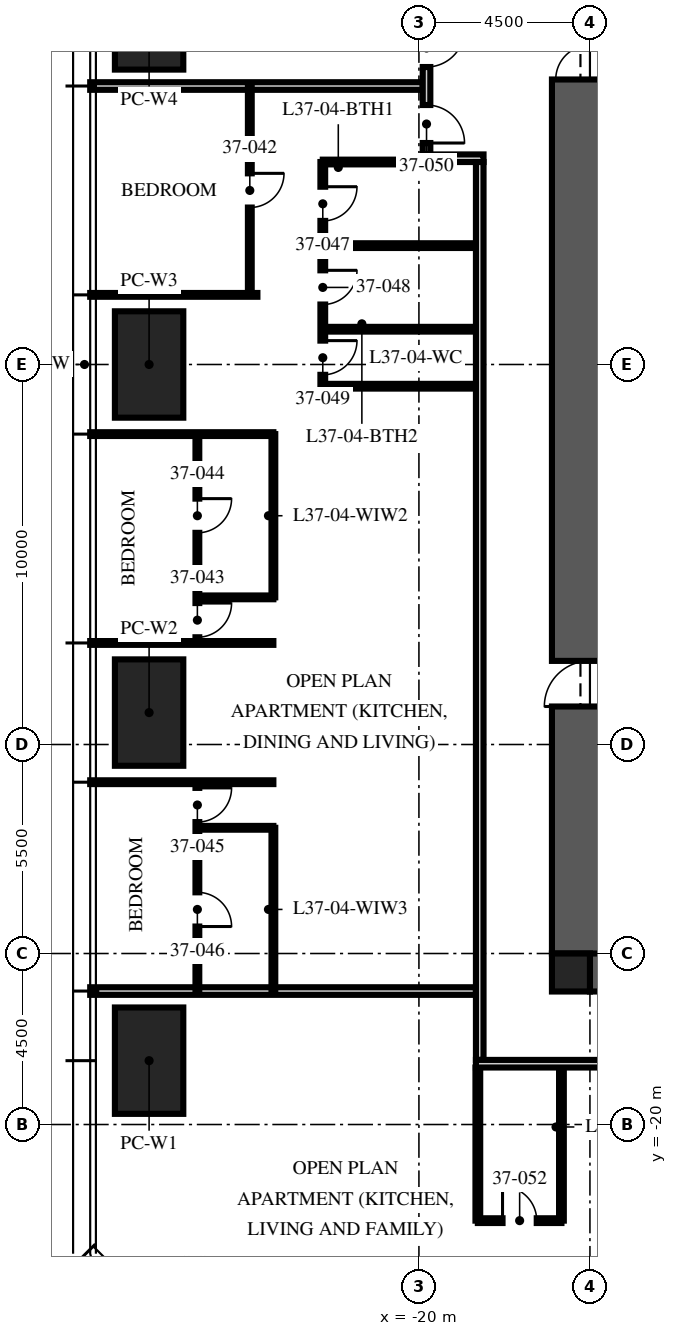
"""IFC4 building model, lengths in metres.
Left out: names, types, materials, properties, quantities, classifications, styles, units other than length and angle.
Written with IfcOpenShell. Run it as: python <this file> out.ifc"""

import sys

from ifc_helpers import new_model, si_unit, direction, frame, frame_2d, origin, origin_2d, place, context, subcontext, project, spatial, rectangle, extrude, element, fill, save


model = new_model("IFC4")
c1 = context("Model", 3, precision=1e-05, world=origin(), true_north=direction((0.0, 1.0)))
c2 = subcontext(c1, "Body", "Model", "MODEL_VIEW")
j1 = project(units=[si_unit("LENGTHUNIT", "METRE"), si_unit("PLANEANGLEUNIT", "RADIAN")], contexts=[c1])
p1 = place(None, origin())
s1 = spatial("IfcSite", under=j1, at=p1, CompositionType="ELEMENT")
p2 = place(p1, origin())
s2 = spatial("IfcBuilding", under=s1, at=p2, CompositionType="ELEMENT")
p3 = place(p2, frame((0.0, 0.0, 148.5)))
s3 = spatial("IfcBuildingStorey", under=s2, at=p3, CompositionType="ELEMENT", Elevation=148.5)
p4 = place(p3, frame((-15.5, -15.5, -0.25), z_axis=(0.0, 0.0, 1.0), x_axis=(1.0, 0.0, 0.0)))
e1 = element("IfcWall", 1, at=p4, inside=s3, PredefinedType="SHEAR", context=c2, shape_type="SweptSolid", body=[
    extrude(rectangle(XDim=31.0, YDim=2.0, at=frame_2d((15.5, 0.0))), origin(), (0.0, 0.0, 1.0), 3.75),
])
p5 = place(p4, frame((10.4, 0.0, 0.25)))
e2 = element("IfcOpeningElement", 2, at=p5, cuts=e1, PredefinedType="OPENING", context=c2, shape_type="SweptSolid", body=[
    extrude(rectangle(XDim=1.1, YDim=2.1, at=frame_2d((0.55, 1.05))), frame((0.0, 1.01, 0.0), z_axis=(0.0, -1.0, 0.0), x_axis=(1.0, 0.0, 0.0)), (0.0, 0.0, 1.0), 2.02),
])
p6 = place(p4, frame((13.5, 0.0, 0.25)))
e3 = element("IfcOpeningElement", 3, at=p6, cuts=e1, PredefinedType="OPENING", context=c2, shape_type="SweptSolid", body=[
    extrude(rectangle(XDim=1.1, YDim=2.1, at=frame_2d((0.55, 1.05))), frame((0.0, 1.01, 0.0), z_axis=(0.0, -1.0, 0.0), x_axis=(1.0, 0.0, 0.0)), (0.0, 0.0, 1.0), 2.02),
])
p7 = place(p4, frame((16.6, 0.0, 0.25)))
e4 = element("IfcOpeningElement", 4, at=p7, cuts=e1, PredefinedType="OPENING", context=c2, shape_type="SweptSolid", body=[
    extrude(rectangle(XDim=1.1, YDim=2.1, at=frame_2d((0.55, 1.05))), frame((0.0, 1.01, 0.0), z_axis=(0.0, -1.0, 0.0), x_axis=(1.0, 0.0, 0.0)), (0.0, 0.0, 1.0), 2.02),
])
p8 = place(p3, frame((-15.5, -12.0, -0.25), z_axis=(0.0, 0.0, 1.0), x_axis=(1.0, 0.0, 0.0)))
e5 = element("IfcWall", 5, at=p8, inside=s3, PredefinedType="SHEAR", context=c2, shape_type="SweptSolid", body=[
    extrude(rectangle(XDim=31.0, YDim=0.8, at=frame_2d((15.5, 0.0))), origin(), (0.0, 0.0, 1.0), 3.75),
])
p9 = place(p3, frame((-15.5, -15.5, -0.25), z_axis=(0.0, 0.0, 1.0), x_axis=(0.0, 1.0, 0.0)))
e6 = element("IfcWall", 6, at=p9, inside=s3, PredefinedType="SHEAR", context=c2, shape_type="SweptSolid", body=[
    extrude(rectangle(XDim=31.0, YDim=2.0, at=frame_2d((15.5, 0.0))), origin(), (0.0, 0.0, 1.0), 3.75),
])
p10 = place(p9, frame((6.5, 0.0, 0.25)))
e7 = element("IfcOpeningElement", 7, at=p10, cuts=e6, PredefinedType="OPENING", context=c2, shape_type="SweptSolid", body=[
    extrude(rectangle(XDim=1.2, YDim=2.1, at=frame_2d((0.6, 1.05))), frame((0.0, 1.01, 0.0), z_axis=(0.0, -1.0, 0.0), x_axis=(1.0, 0.0, 0.0)), (0.0, 0.0, 1.0), 2.02),
])
p11 = place(p9, frame((23.0, 0.0, 0.25)))
e8 = element("IfcOpeningElement", 8, at=p11, cuts=e6, PredefinedType="OPENING", context=c2, shape_type="SweptSolid", body=[
    extrude(rectangle(XDim=1.8, YDim=2.1, at=frame_2d((0.9, 1.05))), frame((0.0, 1.01, 0.0), z_axis=(0.0, -1.0, 0.0), x_axis=(1.0, 0.0, 0.0)), (0.0, 0.0, 1.0), 2.02),
])
p12 = place(p3, frame((-16.0, -16.0, -0.25), z_axis=(0.0, 0.0, 1.0), x_axis=(1.0, 0.0, 0.0)))
e9 = element("IfcColumn", 9, at=p12, inside=s3, PredefinedType="COLUMN", context=c2, shape_type="SweptSolid", body=[
    extrude(rectangle(XDim=1.0, YDim=1.0, at=origin_2d()), origin(), (0.0, 0.0, 1.0), 3.75),
])
for number, where, z_axis, x_axis in (
    (10, (-27.1, -18.32, 0.0), (0.0, 0.0, 1.0), (0.0, 1.0, 0.0)),
    (11, (-27.1, -9.16, 0.0), (0.0, 0.0, 1.0), (0.0, 1.0, 0.0)),
    (12, (-27.1, 0.0, 0.0), (0.0, 0.0, 1.0), (0.0, 1.0, 0.0)),
    (13, (-27.1, 9.16, 0.0), (0.0, 0.0, 1.0), (0.0, 1.0, 0.0)),
):
    element("IfcColumn", number, at=place(p3, frame(where, z_axis=z_axis, x_axis=x_axis)), inside=s3, PredefinedType="COLUMN", context=c2, shape_type="SweptSolid", body=[
        extrude(rectangle(XDim=2.8, YDim=1.8, at=origin_2d()), origin(), (0.0, 0.0, 1.0), 3.75),
    ])
p13 = place(p3, frame((-19.9, 7.328, 0.0), z_axis=(0.0, 0.0, 1.0), x_axis=(-1.0, 0.0, 0.0)))
e14 = element("IfcWall", 14, at=p13, inside=s3, PredefinedType="PARTITIONING", context=c2, shape_type="SweptSolid", body=[
    extrude(rectangle(XDim=8.75, YDim=0.2, at=frame_2d((4.375, 0.0))), origin(), (0.0, 0.0, 1.0), 2.81),
])
p14 = place(p3, frame((-24.25, 1.832, 0.0), z_axis=(0.0, 0.0, 1.0), x_axis=(-1.0, 0.0, 0.0)))
e15 = element("IfcWall", 15, at=p14, inside=s3, PredefinedType="PARTITIONING", context=c2, shape_type="SweptSolid", body=[
    extrude(rectangle(XDim=4.4, YDim=0.1, at=frame_2d((2.2, 0.0))), origin(), (0.0, 0.0, 1.0), 2.81),
])
for number, where, z_axis, x_axis in (
    (16, (-23.83, -1.832, 0.0), (0.0, 0.0, 1.0), (-1.0, 0.0, 0.0)),
    (17, (-23.83, -7.328, 0.0), (0.0, 0.0, 1.0), (-1.0, 0.0, 0.0)),
    (18, (-23.83, -10.992, 0.0), (0.0, 0.0, 1.0), (-1.0, 0.0, 0.0)),
):
    element("IfcWall", number, at=place(p3, frame(where, z_axis=z_axis, x_axis=x_axis)), inside=s3, PredefinedType="PARTITIONING", context=c2, shape_type="SweptSolid", body=[
        extrude(rectangle(XDim=4.82, YDim=0.1, at=frame_2d((2.41, 0.0))), origin(), (0.0, 0.0, 1.0), 2.81),
    ])
p15 = place(p3, frame((-18.5, -16.488, 0.0), z_axis=(0.0, 0.0, 1.0), x_axis=(-1.0, 0.0, 0.0)))
e19 = element("IfcWall", 19, at=p15, inside=s3, PredefinedType="PARTITIONING", context=c2, shape_type="SweptSolid", body=[
    extrude(rectangle(XDim=10.15, YDim=0.2, at=frame_2d((5.075, 0.0))), origin(), (0.0, 0.0, 1.0), 2.81),
])
p16 = place(p3, frame((-24.45, 7.328, 0.0), z_axis=(0.0, 0.0, 1.0), x_axis=(0.0, -1.0, 0.0)))
e20 = element("IfcWall", 20, at=p16, inside=s3, PredefinedType="PARTITIONING", context=c2, shape_type="SweptSolid", body=[
    extrude(rectangle(XDim=5.496, YDim=0.1, at=frame_2d((2.748, 0.0))), origin(), (0.0, 0.0, 1.0), 2.81),
])
p17 = place(p16, frame((2.298, 0.0, 0.0)))
e21 = element("IfcOpeningElement", 21, at=p17, cuts=e20, PredefinedType="OPENING", context=c2, shape_type="SweptSolid", body=[
    extrude(rectangle(XDim=0.9, YDim=2.1, at=frame_2d((0.45, 1.05))), frame((0.0, 0.06, 0.0), z_axis=(0.0, -1.0, 0.0), x_axis=(1.0, 0.0, 0.0)), (0.0, 0.0, 1.0), 0.12),
])
p18 = place(p3, frame((-25.83, -1.832, 0.0), z_axis=(0.0, 0.0, 1.0), x_axis=(0.0, -1.0, 0.0)))
e22 = element("IfcWall", 22, at=p18, inside=s3, PredefinedType="PARTITIONING", context=c2, shape_type="SweptSolid", body=[
    extrude(rectangle(XDim=5.496, YDim=0.1, at=frame_2d((2.748, 0.0))), origin(), (0.0, 0.0, 1.0), 2.81),
])
p19 = place(p18, frame((4.446, 0.0, 0.0)))
e23 = element("IfcOpeningElement", 23, at=p19, cuts=e22, PredefinedType="OPENING", context=c2, shape_type="SweptSolid", body=[
    extrude(rectangle(XDim=0.9, YDim=2.1, at=frame_2d((0.45, 1.05))), frame((0.0, 0.06, 0.0), z_axis=(0.0, -1.0, 0.0), x_axis=(1.0, 0.0, 0.0)), (0.0, 0.0, 1.0), 0.12),
])
p20 = place(p18, frame((1.698, 0.0, 0.0)))
e24 = element("IfcOpeningElement", 24, at=p20, cuts=e22, PredefinedType="OPENING", context=c2, shape_type="SweptSolid", body=[
    extrude(rectangle(XDim=0.9, YDim=2.1, at=frame_2d((0.45, 1.05))), frame((0.0, 0.06, 0.0), z_axis=(0.0, -1.0, 0.0), x_axis=(1.0, 0.0, 0.0)), (0.0, 0.0, 1.0), 0.12),
])
p21 = place(p3, frame((-23.83, -6.128, 0.0), z_axis=(0.0, 0.0, 1.0), x_axis=(-1.0, 0.0, 0.0)))
e25 = element("IfcWall", 25, at=p21, inside=s3, PredefinedType="PARTITIONING", context=c2, shape_type="SweptSolid", body=[
    extrude(rectangle(XDim=2.0, YDim=0.1, at=frame_2d((1.0, 0.0))), origin(), (0.0, 0.0, 1.0), 3.5),
])
p22 = place(p3, frame((-23.83, -1.832, 0.0), z_axis=(0.0, 0.0, 1.0), x_axis=(0.0, -1.0, 0.0)))
e26 = element("IfcWall", 26, at=p22, inside=s3, PredefinedType="PARTITIONING", context=c2, shape_type="SweptSolid", body=[
    extrude(rectangle(XDim=4.296, YDim=0.1, at=frame_2d((2.148, 0.0))), origin(), (0.0, 0.0, 1.0), 2.81),
])
p23 = place(p3, frame((-25.83, -10.992, 0.0), z_axis=(0.0, 0.0, 1.0), x_axis=(0.0, -1.0, 0.0)))
e27 = element("IfcWall", 27, at=p23, inside=s3, PredefinedType="PARTITIONING", context=c2, shape_type="SweptSolid", body=[
    extrude(rectangle(XDim=5.496, YDim=0.1, at=frame_2d((2.748, 0.0))), origin(), (0.0, 0.0, 1.0), 2.81),
])
p24 = place(p23, frame((0.15, 0.0, 0.0)))
e28 = element("IfcOpeningElement", 28, at=p24, cuts=e27, PredefinedType="OPENING", context=c2, shape_type="SweptSolid", body=[
    extrude(rectangle(XDim=0.9, YDim=2.1, at=frame_2d((0.45, 1.05))), frame((0.0, 0.06, 0.0), z_axis=(0.0, -1.0, 0.0), x_axis=(1.0, 0.0, 0.0)), (0.0, 0.0, 1.0), 0.12),
])
p25 = place(p23, frame((2.898, 0.0, 0.0)))
e29 = element("IfcOpeningElement", 29, at=p25, cuts=e27, PredefinedType="OPENING", context=c2, shape_type="SweptSolid", body=[
    extrude(rectangle(XDim=0.9, YDim=2.1, at=frame_2d((0.45, 1.05))), frame((0.0, 0.06, 0.0), z_axis=(0.0, -1.0, 0.0), x_axis=(1.0, 0.0, 0.0)), (0.0, 0.0, 1.0), 0.12),
])
p26 = place(p3, frame((-23.83, -12.192, 0.0), z_axis=(0.0, 0.0, 1.0), x_axis=(-1.0, 0.0, 0.0)))
e30 = element("IfcWall", 30, at=p26, inside=s3, PredefinedType="PARTITIONING", context=c2, shape_type="SweptSolid", body=[
    extrude(rectangle(XDim=2.0, YDim=0.1, at=frame_2d((1.0, 0.0))), origin(), (0.0, 0.0, 1.0), 3.5),
])
p27 = place(p3, frame((-23.83, -12.192, 0.0), z_axis=(0.0, 0.0, 1.0), x_axis=(0.0, -1.0, 0.0)))
e31 = element("IfcWall", 31, at=p27, inside=s3, PredefinedType="PARTITIONING", context=c2, shape_type="SweptSolid", body=[
    extrude(rectangle(XDim=4.296, YDim=0.1, at=frame_2d((2.148, 0.0))), origin(), (0.0, 0.0, 1.0), 2.81),
])
p28 = place(p3, frame((-22.53, 5.328, 0.0), z_axis=(0.0, 0.0, 1.0), x_axis=(0.0, -1.0, 0.0)))
e32 = element("IfcWall", 32, at=p28, inside=s3, PredefinedType="PARTITIONING", context=c2, shape_type="SweptSolid", body=[
    extrude(rectangle(XDim=5.9, YDim=0.125, at=frame_2d((2.95, 0.0))), origin(), (0.0, 0.0, 1.0), 2.7),
])
p29 = place(p28, frame((0.65, 0.0, 0.0)))
e33 = element("IfcOpeningElement", 33, at=p29, cuts=e32, PredefinedType="OPENING", context=c2, shape_type="SweptSolid", body=[
    extrude(rectangle(XDim=0.9, YDim=2.1, at=frame_2d((0.45, 1.05))), frame((0.0, 0.073, 0.0), z_axis=(0.0, -1.0, 0.0), x_axis=(1.0, 0.0, 0.0)), (0.0, 0.0, 1.0), 0.145),
])
p30 = place(p28, frame((2.85, 0.0, 0.0)))
e34 = element("IfcOpeningElement", 34, at=p30, cuts=e32, PredefinedType="OPENING", context=c2, shape_type="SweptSolid", body=[
    extrude(rectangle(XDim=0.9, YDim=2.1, at=frame_2d((0.45, 1.05))), frame((0.0, 0.073, 0.0), z_axis=(0.0, -1.0, 0.0), x_axis=(1.0, 0.0, 0.0)), (0.0, 0.0, 1.0), 0.145),
])
p31 = place(p28, frame((4.7, 0.0, 0.0)))
e35 = element("IfcOpeningElement", 35, at=p31, cuts=e32, PredefinedType="OPENING", context=c2, shape_type="SweptSolid", body=[
    extrude(rectangle(XDim=0.9, YDim=2.1, at=frame_2d((0.45, 1.05))), frame((0.0, 0.073, 0.0), z_axis=(0.0, -1.0, 0.0), x_axis=(1.0, 0.0, 0.0)), (0.0, 0.0, 1.0), 0.145),
])
p32 = place(p3, frame((-19.97, 5.328, 0.0), z_axis=(0.0, 0.0, 1.0), x_axis=(-1.0, 0.0, 0.0)))
e36 = element("IfcWall", 36, at=p32, inside=s3, PredefinedType="PARTITIONING", context=c2, shape_type="SweptSolid", body=[
    extrude(rectangle(XDim=2.56, YDim=0.125, at=frame_2d((1.28, 0.0))), origin(), (0.0, 0.0, 1.0), 3.5),
])
for number, where, z_axis, x_axis in (
    (37, (-18.5, 3.128, 0.0), (0.0, 0.0, 1.0), (-1.0, 0.0, 0.0)),
    (38, (-18.5, 0.928, 0.0), (0.0, 0.0, 1.0), (-1.0, 0.0, 0.0)),
    (39, (-18.5, -0.572, 0.0), (0.0, 0.0, 1.0), (-1.0, 0.0, 0.0)),
):
    element("IfcWall", number, at=place(p3, frame(where, z_axis=z_axis, x_axis=x_axis)), inside=s3, PredefinedType="PARTITIONING", context=c2, shape_type="SweptSolid", body=[
        extrude(rectangle(XDim=4.03, YDim=0.125, at=frame_2d((2.015, 0.0))), origin(), (0.0, 0.0, 1.0), 3.5),
    ])
p33 = place(p3, frame((-18.45, -22.53, 0.0), z_axis=(0.0, 0.0, 1.0), x_axis=(1.0, 0.0, 0.0)))
e40 = element("IfcWall", 40, at=p33, inside=s3, PredefinedType="PARTITIONING", context=c2, shape_type="SweptSolid", body=[
    extrude(rectangle(XDim=2.2, YDim=0.125, at=frame_2d((1.1, 0.0))), origin(), (0.0, 0.0, 1.0), 2.7),
])
p34 = place(p33, frame((0.65, 0.0, 0.0)))
e41 = element("IfcOpeningElement", 41, at=p34, cuts=e40, PredefinedType="OPENING", context=c2, shape_type="SweptSolid", body=[
    extrude(rectangle(XDim=0.9, YDim=2.1, at=frame_2d((0.45, 1.05))), frame((0.0, 0.073, 0.0), z_axis=(0.0, -1.0, 0.0), x_axis=(1.0, 0.0, 0.0)), (0.0, 0.0, 1.0), 0.145),
])
p35 = place(p3, frame((-18.45, -18.5, 0.0), z_axis=(0.0, 0.0, 1.0), x_axis=(0.0, -1.0, 0.0)))
e42 = element("IfcWall", 42, at=p35, inside=s3, PredefinedType="PARTITIONING", context=c2, shape_type="SweptSolid", body=[
    extrude(rectangle(XDim=4.03, YDim=0.125, at=frame_2d((2.015, 0.0))), origin(), (0.0, 0.0, 1.0), 2.3),
])
p36 = place(p3, frame((-16.25, -18.5, 0.0), z_axis=(0.0, 0.0, 1.0), x_axis=(0.0, -1.0, 0.0)))
e43 = element("IfcWall", 43, at=p36, inside=s3, PredefinedType="PARTITIONING", context=c2, shape_type="SweptSolid", body=[
    extrude(rectangle(XDim=4.03, YDim=0.125, at=frame_2d((2.015, 0.0))), origin(), (0.0, 0.0, 1.0), 3.5),
])
p37 = place(p3, frame((-18.3, 5.428, 0.0), z_axis=(0.0, 0.0, 1.0), x_axis=(-1.0, 0.0, 0.0)))
e44 = element("IfcWall", 44, at=p37, inside=s3, PredefinedType="PARTITIONING", context=c2, shape_type="SweptSolid", body=[
    extrude(rectangle(XDim=1.6, YDim=0.2, at=frame_2d((0.8, 0.0))), origin(), (0.0, 0.0, 1.0), 3.5),
])
p38 = place(p3, frame((-19.8, 9.128, 0.0), z_axis=(0.0, 0.0, 1.0), x_axis=(0.0, -1.0, 0.0)))
e45 = element("IfcWall", 45, at=p38, inside=s3, PredefinedType="PARTITIONING", context=c2, shape_type="SweptSolid", body=[
    extrude(rectangle(XDim=3.6, YDim=0.2, at=frame_2d((1.8, 0.0))), origin(), (0.0, 0.0, 1.0), 2.7),
])
p39 = place(p38, frame((0.3, 0.0, 0.0)))
e46 = element("IfcOpeningElement", 46, at=p39, cuts=e45, PredefinedType="OPENING", context=c2, shape_type="SweptSolid", body=[
    extrude(rectangle(XDim=1.0, YDim=2.2, at=frame_2d((0.5, 1.1))), frame((0.0, 0.11, 0.0), z_axis=(0.0, -1.0, 0.0), x_axis=(1.0, 0.0, 0.0)), (0.0, 0.0, 1.0), 0.22),
])
p40 = place(p38, frame((2.3, 0.0, 0.0)))
e47 = element("IfcOpeningElement", 47, at=p40, cuts=e45, PredefinedType="OPENING", context=c2, shape_type="SweptSolid", body=[
    extrude(rectangle(XDim=1.0, YDim=2.2, at=frame_2d((0.5, 1.1))), frame((0.0, 0.11, 0.0), z_axis=(0.0, -1.0, 0.0), x_axis=(1.0, 0.0, 0.0)), (0.0, 0.0, 1.0), 0.22),
])
p41 = place(p3, frame((-18.4, 5.328, 0.0), z_axis=(0.0, 0.0, 1.0), x_axis=(0.0, -1.0, 0.0)))
e48 = element("IfcWall", 48, at=p41, inside=s3, PredefinedType="PARTITIONING", context=c2, shape_type="SweptSolid", body=[
    extrude(rectangle(XDim=23.628, YDim=0.2, at=frame_2d((11.814, 0.0))), origin(), (0.0, 0.0, 1.0), 2.3),
])
p42 = place(p3, frame((-8.6, -18.4, 0.0), z_axis=(0.0, 0.0, 1.0), x_axis=(-1.0, 0.0, 0.0)))
e49 = element("IfcWall", 49, at=p42, inside=s3, PredefinedType="PARTITIONING", context=c2, shape_type="SweptSolid", body=[
    extrude(rectangle(XDim=9.9, YDim=0.2, at=frame_2d((4.95, 0.0))), origin(), (0.0, 0.0, 1.0), 2.3),
])
p43 = place(p42, frame((0.75, 0.0, 0.0)))
e50 = element("IfcOpeningElement", 50, at=p43, cuts=e49, PredefinedType="OPENING", context=c2, shape_type="SweptSolid", body=[
    extrude(rectangle(XDim=1.0, YDim=2.2, at=frame_2d((0.5, 1.1))), frame((0.0, 0.11, 0.0), z_axis=(0.0, -1.0, 0.0), x_axis=(1.0, 0.0, 0.0)), (0.0, 0.0, 1.0), 0.22),
])
p44 = place(p10, origin())
e51 = element("IfcDoor", 51, at=p44, inside=s3, OperationType="SINGLE_SWING_LEFT", PredefinedType="DOOR", context=c2, shape_type="SweptSolid", body=[
    extrude(rectangle(XDim=1.2, YDim=2.1, at=frame_2d((0.6, 1.05))), frame((0.0, 0.025, 0.0), z_axis=(0.0, -1.0, 0.0), x_axis=(1.0, 0.0, 0.0)), (0.0, 0.0, 1.0), 0.05),
])
fill(e7, e51)
p45 = place(p11, origin())
e52 = element("IfcDoor", 52, at=p45, inside=s3, OperationType="DOUBLE_DOOR_SINGLE_SWING", PredefinedType="DOOR", context=c2, shape_type="SweptSolid", body=[
    extrude(rectangle(XDim=1.8, YDim=2.1, at=frame_2d((0.9, 1.05))), frame((0.0, 0.025, 0.0), z_axis=(0.0, -1.0, 0.0), x_axis=(1.0, 0.0, 0.0)), (0.0, 0.0, 1.0), 0.05),
])
fill(e8, e52)
p46 = place(p39, origin())
e53 = element("IfcDoor", 53, at=p46, inside=s3, OperationType="SINGLE_SWING_LEFT", PredefinedType="DOOR", context=c2, shape_type="SweptSolid", body=[
    extrude(rectangle(XDim=1.0, YDim=2.2, at=frame_2d((0.5, 1.1))), frame((0.0, 0.025, 0.0), z_axis=(0.0, -1.0, 0.0), x_axis=(1.0, 0.0, 0.0)), (0.0, 0.0, 1.0), 0.05),
])
fill(e46, e53)
p47 = place(p17, origin())
e54 = element("IfcDoor", 54, at=p47, inside=s3, OperationType="SINGLE_SWING_LEFT", PredefinedType="DOOR", context=c2, shape_type="SweptSolid", body=[
    extrude(rectangle(XDim=0.9, YDim=2.1, at=frame_2d((0.45, 1.05))), frame((0.0, 0.025, 0.0), z_axis=(0.0, -1.0, 0.0), x_axis=(1.0, 0.0, 0.0)), (0.0, 0.0, 1.0), 0.05),
])
fill(e21, e54)
p48 = place(p19, origin())
e55 = element("IfcDoor", 55, at=p48, inside=s3, OperationType="SINGLE_SWING_LEFT", PredefinedType="DOOR", context=c2, shape_type="SweptSolid", body=[
    extrude(rectangle(XDim=0.9, YDim=2.1, at=frame_2d((0.45, 1.05))), frame((0.0, 0.025, 0.0), z_axis=(0.0, -1.0, 0.0), x_axis=(1.0, 0.0, 0.0)), (0.0, 0.0, 1.0), 0.05),
])
fill(e23, e55)
p49 = place(p20, origin())
e56 = element("IfcDoor", 56, at=p49, inside=s3, OperationType="SINGLE_SWING_LEFT", PredefinedType="DOOR", context=c2, shape_type="SweptSolid", body=[
    extrude(rectangle(XDim=0.9, YDim=2.1, at=frame_2d((0.45, 1.05))), frame((0.0, 0.025, 0.0), z_axis=(0.0, -1.0, 0.0), x_axis=(1.0, 0.0, 0.0)), (0.0, 0.0, 1.0), 0.05),
])
fill(e24, e56)
p50 = place(p24, origin())
e57 = element("IfcDoor", 57, at=p50, inside=s3, OperationType="SINGLE_SWING_LEFT", PredefinedType="DOOR", context=c2, shape_type="SweptSolid", body=[
    extrude(rectangle(XDim=0.9, YDim=2.1, at=frame_2d((0.45, 1.05))), frame((0.0, 0.025, 0.0), z_axis=(0.0, -1.0, 0.0), x_axis=(1.0, 0.0, 0.0)), (0.0, 0.0, 1.0), 0.05),
])
fill(e28, e57)
p51 = place(p25, origin())
e58 = element("IfcDoor", 58, at=p51, inside=s3, OperationType="SINGLE_SWING_RIGHT", PredefinedType="DOOR", context=c2, shape_type="SweptSolid", body=[
    extrude(rectangle(XDim=0.9, YDim=2.1, at=frame_2d((0.45, 1.05))), frame((0.0, 0.025, 0.0), z_axis=(0.0, -1.0, 0.0), x_axis=(1.0, 0.0, 0.0)), (0.0, 0.0, 1.0), 0.05),
])
fill(e29, e58)
p52 = place(p29, origin())
e59 = element("IfcDoor", 59, at=p52, inside=s3, OperationType="SINGLE_SWING_LEFT", PredefinedType="DOOR", context=c2, shape_type="SweptSolid", body=[
    extrude(rectangle(XDim=0.9, YDim=2.1, at=frame_2d((0.45, 1.05))), frame((0.0, 0.025, 0.0), z_axis=(0.0, -1.0, 0.0), x_axis=(1.0, 0.0, 0.0)), (0.0, 0.0, 1.0), 0.05),
])
fill(e33, e59)
p53 = place(p30, origin())
e60 = element("IfcDoor", 60, at=p53, inside=s3, OperationType="SINGLE_SWING_LEFT", PredefinedType="DOOR", context=c2, shape_type="SweptSolid", body=[
    extrude(rectangle(XDim=0.9, YDim=2.1, at=frame_2d((0.45, 1.05))), frame((0.0, 0.025, 0.0), z_axis=(0.0, -1.0, 0.0), x_axis=(1.0, 0.0, 0.0)), (0.0, 0.0, 1.0), 0.05),
])
fill(e34, e60)
p54 = place(p31, origin())
e61 = element("IfcDoor", 61, at=p54, inside=s3, OperationType="SINGLE_SWING_LEFT", PredefinedType="DOOR", context=c2, shape_type="SweptSolid", body=[
    extrude(rectangle(XDim=0.9, YDim=2.1, at=frame_2d((0.45, 1.05))), frame((0.0, 0.025, 0.0), z_axis=(0.0, -1.0, 0.0), x_axis=(1.0, 0.0, 0.0)), (0.0, 0.0, 1.0), 0.05),
])
fill(e35, e61)
p55 = place(p40, origin())
e62 = element("IfcDoor", 62, at=p55, inside=s3, OperationType="SINGLE_SWING_RIGHT", PredefinedType="DOOR", context=c2, shape_type="SweptSolid", body=[
    extrude(rectangle(XDim=1.0, YDim=2.2, at=frame_2d((0.5, 1.1))), frame((0.0, 0.025, 0.0), z_axis=(0.0, -1.0, 0.0), x_axis=(1.0, 0.0, 0.0)), (0.0, 0.0, 1.0), 0.05),
])
fill(e47, e62)
p56 = place(p34, origin())
e63 = element("IfcDoor", 63, at=p56, inside=s3, OperationType="SINGLE_SWING_LEFT", PredefinedType="DOOR", context=c2, shape_type="SweptSolid", body=[
    extrude(rectangle(XDim=0.9, YDim=2.1, at=frame_2d((0.45, 1.05))), frame((0.0, 0.025, 0.0), z_axis=(0.0, -1.0, 0.0), x_axis=(1.0, 0.0, 0.0)), (0.0, 0.0, 1.0), 0.05),
])
fill(e41, e63)
save(model, sys.argv[1])
